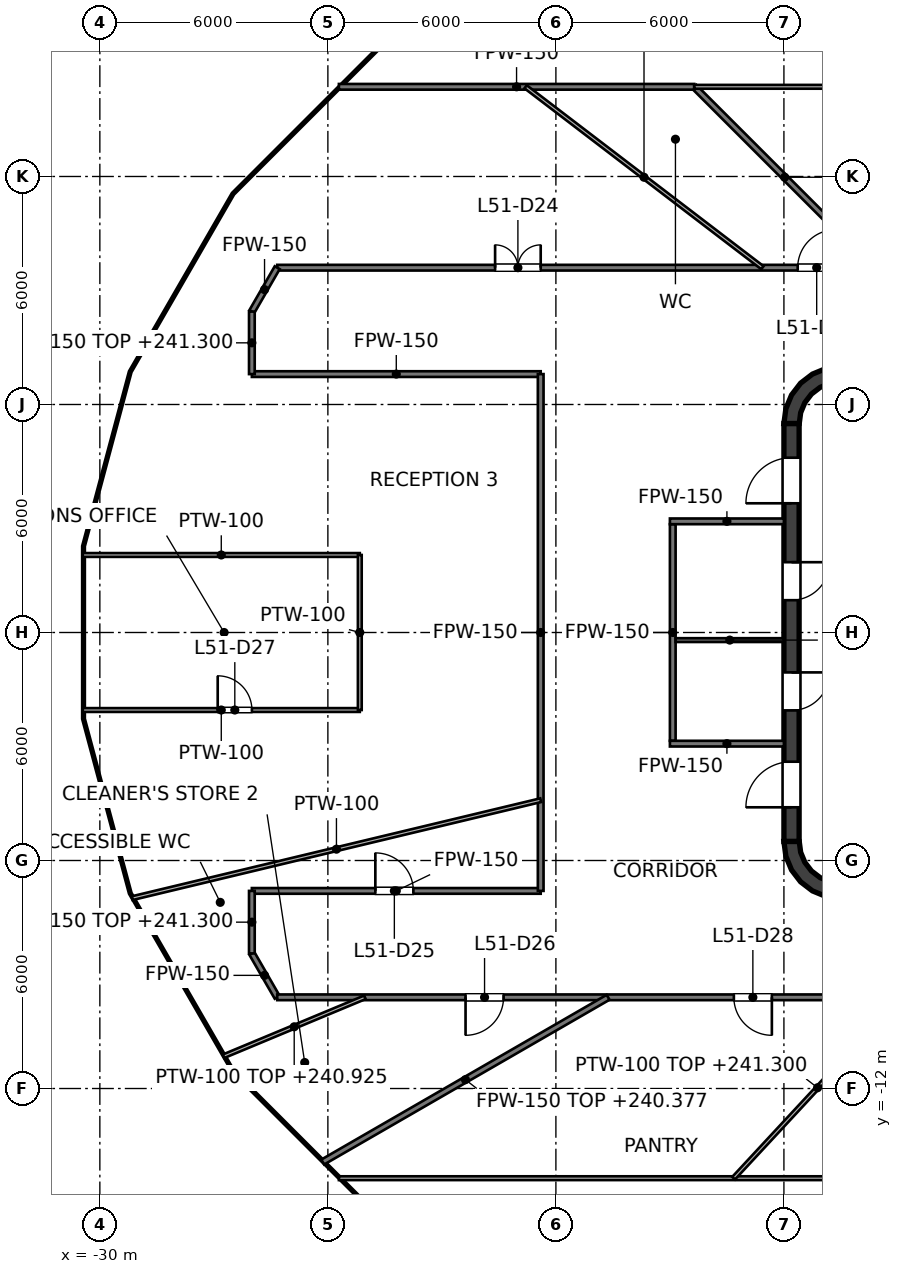
"""IFC4 building model, lengths in metres.
Left out: names, types, materials, properties, quantities, classifications, styles, units other than length and angle.
Written with IfcOpenShell. Run it as: python <this file> out.ifc"""

import sys

from ifc_helpers import new_model, si_unit, direction, frame, frame_2d, origin, place, context, subcontext, project, spatial, polyline, rectangle, outline, extrude, element, fill, save


model = new_model("IFC4")
c1 = context("Model", 3, precision=1e-05, world=origin(), true_north=direction((0.0, 1.0)))
c2 = subcontext(c1, "Body", "Model", "MODEL_VIEW")
j1 = project(units=[si_unit("LENGTHUNIT", "METRE"), si_unit("PLANEANGLEUNIT", "RADIAN")], contexts=[c1])
p1 = place(None, origin())
s1 = spatial("IfcSite", under=j1, at=p1, CompositionType="ELEMENT")
p2 = place(p1, origin())
s2 = spatial("IfcBuilding", under=s1, at=p2, CompositionType="ELEMENT")
p3 = place(p2, frame((0.0, 0.0, 237.6)))
s3 = spatial("IfcBuildingStorey", under=s2, at=p3, CompositionType="ELEMENT", Elevation=237.6)
p4 = place(p3, frame((-11.8, -5.5, 0.0), z_axis=(0.0, 0.0, 1.0), x_axis=(0.0, 1.0, 0.0)))
e1 = element("IfcWall", 1, at=p4, inside=s3, PredefinedType="SHEAR", context=c2, shape_type="SweptSolid", body=[
    extrude(rectangle(XDim=11.0, YDim=0.4, at=frame_2d((5.5, 0.0))), origin(), (0.0, 0.0, 1.0), 4.0),
])
p5 = place(p4, frame((3.45, 0.0, 0.0)))
e2 = element("IfcOpeningElement", 2, at=p5, cuts=e1, PredefinedType="OPENING", context=c2, shape_type="SweptSolid", body=[
    extrude(rectangle(XDim=1.0, YDim=2.1, at=frame_2d((0.5, 1.05))), frame((0.0, 0.2, 0.0), z_axis=(0.0, -1.0, 0.0), x_axis=(1.0, 0.0, 0.0)), (0.0, 0.0, 1.0), 0.4),
])
p6 = place(p4, frame((6.35, 0.0, 0.0)))
e3 = element("IfcOpeningElement", 3, at=p6, cuts=e1, PredefinedType="OPENING", context=c2, shape_type="SweptSolid", body=[
    extrude(rectangle(XDim=1.0, YDim=2.1, at=frame_2d((0.5, 1.05))), frame((0.0, 0.2, 0.0), z_axis=(0.0, -1.0, 0.0), x_axis=(1.0, 0.0, 0.0)), (0.0, 0.0, 1.0), 0.4),
])
p7 = place(p4, frame((0.9, 0.0, 0.0)))
e4 = element("IfcOpeningElement", 4, at=p7, cuts=e1, PredefinedType="OPENING", context=c2, shape_type="SweptSolid", body=[
    extrude(rectangle(XDim=1.2, YDim=2.1, at=frame_2d((0.6, 1.05))), frame((0.0, 0.2, 0.0), z_axis=(0.0, -1.0, 0.0), x_axis=(1.0, 0.0, 0.0)), (0.0, 0.0, 1.0), 0.4),
])
p8 = place(p4, frame((8.9, 0.0, 0.0)))
e5 = element("IfcOpeningElement", 5, at=p8, cuts=e1, PredefinedType="OPENING", context=c2, shape_type="SweptSolid", body=[
    extrude(rectangle(XDim=1.2, YDim=2.1, at=frame_2d((0.6, 1.05))), frame((0.0, 0.2, 0.0), z_axis=(0.0, -1.0, 0.0), x_axis=(1.0, 0.0, 0.0)), (0.0, 0.0, 1.0), 0.4),
])
p9 = place(p3, origin())
e6 = element("IfcWall", 6, at=p9, inside=s3, PredefinedType="SHEAR", context=c2, shape_type="SweptSolid", body=[
    extrude(outline(polyline([(-12.0, 5.5), (-11.596, 5.5), (-11.559, 5.784), (-11.45, 6.048), (-11.275, 6.275), (-11.048, 6.45), (-10.784, 6.559), (-10.5, 6.596), (-10.5, 7.0), (-10.888, 6.949), (-11.25, 6.799), (-11.561, 6.561), (-11.799, 6.25), (-11.949, 5.888), (-12.0, 5.5)])), origin(), (0.0, 0.0, 1.0), 4.0),
])
e7 = element("IfcWall", 7, at=p9, inside=s3, PredefinedType="SHEAR", context=c2, shape_type="SweptSolid", body=[
    extrude(outline(polyline([(-10.5, -7.0), (-10.5, -6.596), (-10.784, -6.559), (-11.048, -6.45), (-11.275, -6.275), (-11.45, -6.048), (-11.559, -5.784), (-11.596, -5.5), (-12.0, -5.5), (-11.949, -5.888), (-11.799, -6.25), (-11.561, -6.561), (-11.25, -6.799), (-10.888, -6.949), (-10.5, -7.0)])), origin(), (0.0, 0.0, 1.0), 4.0),
])
p10 = place(p3, frame((-14.925, -2.85, 0.0), z_axis=(0.0, 0.0, 1.0), x_axis=(0.0, 1.0, 0.0)))
e8 = element("IfcWall", 8, at=p10, inside=s3, PredefinedType="PARTITIONING", context=c2, shape_type="SweptSolid", body=[
    extrude(rectangle(XDim=5.7, YDim=0.15, at=frame_2d((2.85, 0.0))), origin(), (0.0, 0.0, 1.0), 2.768),
])
for number, where, z_axis, x_axis in (
    (9, (-15.0, 2.925, 0.0), (0.0, 0.0, 1.0), (1.0, 0.0, 0.0)),
    (10, (-15.0, -2.925, 0.0), (0.0, 0.0, 1.0), (1.0, 0.0, 0.0)),
):
    element("IfcWall", number, at=place(p3, frame(where, z_axis=z_axis, x_axis=x_axis)), inside=s3, PredefinedType="PARTITIONING", context=c2, shape_type="SweptSolid", body=[
        extrude(rectangle(XDim=3.0, YDim=0.15, at=frame_2d((1.5, 0.0))), origin(), (0.0, 0.0, 1.0), 2.768),
    ])
p11 = place(p3, frame((-14.85, -0.2, 0.0), z_axis=(0.0, 0.0, 1.0), x_axis=(1.0, 0.0, 0.0)))
e11 = element("IfcWall", 11, at=p11, inside=s3, PredefinedType="PARTITIONING", context=c2, shape_type="SweptSolid", body=[
    extrude(rectangle(XDim=2.85, YDim=0.1, at=frame_2d((1.425, 0.0))), origin(), (0.0, 0.0, 1.0), 2.768),
])
p12 = place(p3, frame((-26.0, -8.445, 0.0), z_axis=(0.0, 0.0, 1.0), x_axis=(0.500076310463, -0.865981341435, 0.0)))
e12 = element("IfcWall", 12, at=p12, inside=s3, PredefinedType="PARTITIONING", context=c2, shape_type="SweptSolid", body=[
    extrude(rectangle(XDim=1.334, YDim=0.15, at=frame_2d((0.667, 0.0))), origin(), (0.0, 0.0, 1.0), 2.768),
])
p13 = place(p3, frame((-14.36, 14.36, 0.0), z_axis=(0.0, 0.0, 1.0), x_axis=(0.707106781187, -0.707106781187, 0.0)))
e13 = element("IfcWall", 13, at=p13, inside=s3, PredefinedType="PARTITIONING", context=c2, shape_type="SweptSolid", body=[
    extrude(rectangle(XDim=6.732, YDim=0.15, at=frame_2d((3.366, 0.0))), origin(), (0.0, 0.0, 1.0), 2.768),
])
p14 = place(p3, frame((-25.333, -9.6, 0.0), z_axis=(0.0, 0.0, 1.0), x_axis=(1.0, 0.0, 0.0)))
e14 = element("IfcWall", 14, at=p14, inside=s3, PredefinedType="PARTITIONING", context=c2, shape_type="SweptSolid", body=[
    extrude(rectangle(XDim=50.666, YDim=0.15, at=frame_2d((25.333, 0.0))), origin(), (0.0, 0.0, 1.0), 2.768),
])
p15 = place(p14, frame((4.956, 0.0, 0.0)))
e15 = element("IfcOpeningElement", 15, at=p15, cuts=e14, PredefinedType="OPENING", context=c2, shape_type="SweptSolid", body=[
    extrude(rectangle(XDim=1.0, YDim=2.1, at=frame_2d((0.5, 1.05))), frame((0.0, 0.075, 0.0), z_axis=(0.0, -1.0, 0.0), x_axis=(1.0, 0.0, 0.0)), (0.0, 0.0, 1.0), 0.15),
])
p16 = place(p14, frame((12.016, 0.0, 0.0)))
e16 = element("IfcOpeningElement", 16, at=p16, cuts=e14, PredefinedType="OPENING", context=c2, shape_type="SweptSolid", body=[
    extrude(rectangle(XDim=1.0, YDim=2.1, at=frame_2d((0.5, 1.05))), frame((0.0, 0.075, 0.0), z_axis=(0.0, -1.0, 0.0), x_axis=(1.0, 0.0, 0.0)), (0.0, 0.0, 1.0), 0.15),
])
p17 = place(p14, frame((18.068, 0.0, 0.0)))
e17 = element("IfcOpeningElement", 17, at=p17, cuts=e14, PredefinedType="OPENING", context=c2, shape_type="SweptSolid", body=[
    extrude(rectangle(XDim=1.0, YDim=2.1, at=frame_2d((0.5, 1.05))), frame((0.0, 0.075, 0.0), z_axis=(0.0, -1.0, 0.0), x_axis=(1.0, 0.0, 0.0)), (0.0, 0.0, 1.0), 0.15),
])
p18 = place(p14, frame((22.521, 0.0, 0.0)))
e18 = element("IfcOpeningElement", 18, at=p18, cuts=e14, PredefinedType="OPENING", context=c2, shape_type="SweptSolid", body=[
    extrude(rectangle(XDim=1.0, YDim=2.1, at=frame_2d((0.5, 1.05))), frame((0.0, 0.075, 0.0), z_axis=(0.0, -1.0, 0.0), x_axis=(1.0, 0.0, 0.0)), (0.0, 0.0, 1.0), 0.15),
])
p19 = place(p14, frame((26.665, 0.0, 0.0)))
e19 = element("IfcOpeningElement", 19, at=p19, cuts=e14, PredefinedType="OPENING", context=c2, shape_type="SweptSolid", body=[
    extrude(rectangle(XDim=1.0, YDim=2.1, at=frame_2d((0.5, 1.05))), frame((0.0, 0.075, 0.0), z_axis=(0.0, -1.0, 0.0), x_axis=(1.0, 0.0, 0.0)), (0.0, 0.0, 1.0), 0.15),
])
p20 = place(p14, frame((31.12, 0.0, 0.0)))
e20 = element("IfcOpeningElement", 20, at=p20, cuts=e14, PredefinedType="OPENING", context=c2, shape_type="SweptSolid", body=[
    extrude(rectangle(XDim=1.0, YDim=2.1, at=frame_2d((0.5, 1.05))), frame((0.0, 0.075, 0.0), z_axis=(0.0, -1.0, 0.0), x_axis=(1.0, 0.0, 0.0)), (0.0, 0.0, 1.0), 0.15),
])
p21 = place(p14, frame((41.953, 0.0, 0.0)))
e21 = element("IfcOpeningElement", 21, at=p21, cuts=e14, PredefinedType="OPENING", context=c2, shape_type="SweptSolid", body=[
    extrude(rectangle(XDim=1.0, YDim=2.1, at=frame_2d((0.5, 1.05))), frame((0.0, 0.075, 0.0), z_axis=(0.0, -1.0, 0.0), x_axis=(1.0, 0.0, 0.0)), (0.0, 0.0, 1.0), 0.15),
])
p22 = place(p3, frame((-26.0, -6.8, 0.0), z_axis=(0.0, 0.0, 1.0), x_axis=(1.0, 0.0, 0.0)))
e22 = element("IfcWall", 22, at=p22, inside=s3, PredefinedType="PARTITIONING", context=c2, shape_type="SweptSolid", body=[
    extrude(rectangle(XDim=7.6, YDim=0.15, at=frame_2d((3.8, 0.0))), origin(), (0.0, 0.0, 1.0), 2.768),
])
p23 = place(p22, frame((3.249, 0.0, 0.0)))
e23 = element("IfcOpeningElement", 23, at=p23, cuts=e22, PredefinedType="OPENING", context=c2, shape_type="SweptSolid", body=[
    extrude(rectangle(XDim=1.0, YDim=2.1, at=frame_2d((0.5, 1.05))), frame((0.0, 0.075, 0.0), z_axis=(0.0, -1.0, 0.0), x_axis=(1.0, 0.0, 0.0)), (0.0, 0.0, 1.0), 0.15),
])
p24 = place(p3, frame((-26.0, 6.8, 0.0), z_axis=(0.0, 0.0, 1.0), x_axis=(1.0, 0.0, 0.0)))
e24 = element("IfcWall", 24, at=p24, inside=s3, PredefinedType="PARTITIONING", context=c2, shape_type="SweptSolid", body=[
    extrude(rectangle(XDim=7.6, YDim=0.15, at=frame_2d((3.8, 0.0))), origin(), (0.0, 0.0, 1.0), 2.768),
])
p25 = place(p3, frame((-25.333, 9.6, 0.0), z_axis=(0.0, 0.0, 1.0), x_axis=(1.0, 0.0, 0.0)))
e25 = element("IfcWall", 25, at=p25, inside=s3, PredefinedType="PARTITIONING", context=c2, shape_type="SweptSolid", body=[
    extrude(rectangle(XDim=50.666, YDim=0.15, at=frame_2d((25.333, 0.0))), origin(), (0.0, 0.0, 1.0), 2.768),
])
p26 = place(p25, frame((40.221, 0.0, 0.0)))
e26 = element("IfcOpeningElement", 26, at=p26, cuts=e25, PredefinedType="OPENING", context=c2, shape_type="SweptSolid", body=[
    extrude(rectangle(XDim=1.2, YDim=2.1, at=frame_2d((0.6, 1.05))), frame((0.0, 0.075, 0.0), z_axis=(0.0, -1.0, 0.0), x_axis=(1.0, 0.0, 0.0)), (0.0, 0.0, 1.0), 0.15),
])
p27 = place(p25, frame((28.328, 0.0, 0.0)))
e27 = element("IfcOpeningElement", 27, at=p27, cuts=e25, PredefinedType="OPENING", context=c2, shape_type="SweptSolid", body=[
    extrude(rectangle(XDim=1.0, YDim=2.1, at=frame_2d((0.5, 1.05))), frame((0.0, 0.075, 0.0), z_axis=(0.0, -1.0, 0.0), x_axis=(1.0, 0.0, 0.0)), (0.0, 0.0, 1.0), 0.15),
])
p28 = place(p25, frame((24.461, 0.0, 0.0)))
e28 = element("IfcOpeningElement", 28, at=p28, cuts=e25, PredefinedType="OPENING", context=c2, shape_type="SweptSolid", body=[
    extrude(rectangle(XDim=1.0, YDim=2.1, at=frame_2d((0.5, 1.05))), frame((0.0, 0.075, 0.0), z_axis=(0.0, -1.0, 0.0), x_axis=(1.0, 0.0, 0.0)), (0.0, 0.0, 1.0), 0.15),
])
p29 = place(p25, frame((18.938, 0.0, 0.0)))
e29 = element("IfcOpeningElement", 29, at=p29, cuts=e25, PredefinedType="OPENING", context=c2, shape_type="SweptSolid", body=[
    extrude(rectangle(XDim=1.0, YDim=2.1, at=frame_2d((0.5, 1.05))), frame((0.0, 0.075, 0.0), z_axis=(0.0, -1.0, 0.0), x_axis=(1.0, 0.0, 0.0)), (0.0, 0.0, 1.0), 0.15),
])
p30 = place(p25, frame((13.695, 0.0, 0.0)))
e30 = element("IfcOpeningElement", 30, at=p30, cuts=e25, PredefinedType="OPENING", context=c2, shape_type="SweptSolid", body=[
    extrude(rectangle(XDim=1.0, YDim=2.1, at=frame_2d((0.5, 1.05))), frame((0.0, 0.075, 0.0), z_axis=(0.0, -1.0, 0.0), x_axis=(1.0, 0.0, 0.0)), (0.0, 0.0, 1.0), 0.15),
])
p31 = place(p25, frame((5.733, 0.0, 0.0)))
e31 = element("IfcOpeningElement", 31, at=p31, cuts=e25, PredefinedType="OPENING", context=c2, shape_type="SweptSolid", body=[
    extrude(rectangle(XDim=1.2, YDim=2.1, at=frame_2d((0.6, 1.05))), frame((0.0, 0.075, 0.0), z_axis=(0.0, -1.0, 0.0), x_axis=(1.0, 0.0, 0.0)), (0.0, 0.0, 1.0), 0.15),
])
p32 = place(p3, frame((-23.71, 14.36, 0.0), z_axis=(0.0, 0.0, 1.0), x_axis=(1.0, 0.0, 0.0)))
e32 = element("IfcWall", 32, at=p32, inside=s3, PredefinedType="PARTITIONING", context=c2, shape_type="SweptSolid", body=[
    extrude(rectangle(XDim=9.35, YDim=0.15, at=frame_2d((4.675, 0.0))), origin(), (0.0, 0.0, 1.0), 2.768),
])
p33 = place(p3, frame((-24.135, -13.935, 0.0), z_axis=(0.0, 0.0, 1.0), x_axis=(0.866016292776, 0.500015780397, 0.0)))
e33 = element("IfcWall", 33, at=p33, inside=s3, PredefinedType="PARTITIONING", context=c2, shape_type="SweptSolid", body=[
    extrude(rectangle(XDim=8.67, YDim=0.15, at=frame_2d((4.335, 0.0))), origin(), (0.0, 0.0, 1.0), 2.777),
])
p34 = place(p3, frame((-26.0, 8.445, 0.0), z_axis=(0.0, 0.0, 1.0), x_axis=(0.500076310463, 0.865981341435, 0.0)))
e34 = element("IfcWall", 34, at=p34, inside=s3, PredefinedType="PARTITIONING", context=c2, shape_type="SweptSolid", body=[
    extrude(rectangle(XDim=1.334, YDim=0.15, at=frame_2d((0.667, 0.0))), origin(), (0.0, 0.0, 1.0), 2.768),
])
p35 = place(p3, frame((-18.4, -6.8, 0.0), z_axis=(0.0, 0.0, 1.0), x_axis=(0.0, 1.0, 0.0)))
e35 = element("IfcWall", 35, at=p35, inside=s3, PredefinedType="PARTITIONING", context=c2, shape_type="SweptSolid", body=[
    extrude(rectangle(XDim=13.6, YDim=0.15, at=frame_2d((6.8, 0.0))), origin(), (0.0, 0.0, 1.0), 2.768),
])
for number, where, z_axis, x_axis in (
    (36, (-26.0, -8.445, 0.0), (0.0, 0.0, 1.0), (0.0, 1.0, 0.0)),
    (37, (-26.0, 6.8, 0.0), (0.0, 0.0, 1.0), (0.0, 1.0, 0.0)),
):
    element("IfcWall", number, at=place(p3, frame(where, z_axis=z_axis, x_axis=x_axis)), inside=s3, PredefinedType="PARTITIONING", context=c2, shape_type="SweptSolid", body=[
        extrude(rectangle(XDim=1.645, YDim=0.15, at=frame_2d((0.823, 0.0))), origin(), (0.0, 0.0, 1.0), 3.7),
    ])
p36 = place(p3, frame((-18.797, 14.36, 0.0), z_axis=(0.0, 0.0, 1.0), x_axis=(0.794667043869, -0.607045541445, 0.0)))
e38 = element("IfcWall", 38, at=p36, inside=s3, PredefinedType="PARTITIONING", context=c2, shape_type="SweptSolid", body=[
    extrude(rectangle(XDim=7.841, YDim=0.1, at=frame_2d((3.921, 0.0))), origin(), (0.0, 0.0, 1.0), 3.7),
])
p37 = place(p3, frame((-23.71, -14.36, 0.0), z_axis=(0.0, 0.0, 1.0), x_axis=(1.0, 0.0, 0.0)))
e39 = element("IfcWall", 39, at=p37, inside=s3, PredefinedType="PARTITIONING", context=c2, shape_type="SweptSolid", body=[
    extrude(rectangle(XDim=47.42, YDim=0.1, at=frame_2d((23.71, 0.0))), origin(), (0.0, 0.0, 1.0), 2.768),
])
p38 = place(p37, frame((19.302, 0.0, 0.0)))
e40 = element("IfcOpeningElement", 40, at=p38, cuts=e39, PredefinedType="OPENING", context=c2, shape_type="SweptSolid", body=[
    extrude(rectangle(XDim=1.8, YDim=2.1, at=frame_2d((0.9, 1.05))), frame((0.0, 0.05, 0.0), z_axis=(0.0, -1.0, 0.0), x_axis=(1.0, 0.0, 0.0)), (0.0, 0.0, 1.0), 0.1),
])
p39 = place(p37, frame((41.074, 0.0, 0.0)))
e41 = element("IfcOpeningElement", 41, at=p39, cuts=e39, PredefinedType="OPENING", context=c2, shape_type="SweptSolid", body=[
    extrude(rectangle(XDim=1.8, YDim=2.1, at=frame_2d((0.9, 1.05))), frame((0.0, 0.05, 0.0), z_axis=(0.0, -1.0, 0.0), x_axis=(1.0, 0.0, 0.0)), (0.0, 0.0, 1.0), 0.1),
])
p40 = place(p3, frame((-30.45, -2.04, 0.0), z_axis=(0.0, 0.0, 1.0), x_axis=(1.0, 0.0, 0.0)))
e42 = element("IfcWall", 42, at=p40, inside=s3, PredefinedType="PARTITIONING", context=c2, shape_type="SweptSolid", body=[
    extrude(rectangle(XDim=7.29, YDim=0.1, at=frame_2d((3.645, 0.0))), origin(), (0.0, 0.0, 1.0), 2.768),
])
p41 = place(p40, frame((3.551, 0.0, 0.0)))
e43 = element("IfcOpeningElement", 43, at=p41, cuts=e42, PredefinedType="OPENING", context=c2, shape_type="SweptSolid", body=[
    extrude(rectangle(XDim=0.9, YDim=2.1, at=frame_2d((0.45, 1.05))), frame((0.0, 0.05, 0.0), z_axis=(0.0, -1.0, 0.0), x_axis=(1.0, 0.0, 0.0)), (0.0, 0.0, 1.0), 0.1),
])
p42 = place(p3, frame((-30.45, 2.04, 0.0), z_axis=(0.0, 0.0, 1.0), x_axis=(1.0, 0.0, 0.0)))
e44 = element("IfcWall", 44, at=p42, inside=s3, PredefinedType="PARTITIONING", context=c2, shape_type="SweptSolid", body=[
    extrude(rectangle(XDim=7.29, YDim=0.1, at=frame_2d((3.645, 0.0))), origin(), (0.0, 0.0, 1.0), 2.768),
])
p43 = place(p3, frame((-14.36, 14.36, 0.0), z_axis=(0.0, 0.0, 1.0), x_axis=(1.0, 0.0, 0.0)))
e45 = element("IfcWall", 45, at=p43, inside=s3, PredefinedType="PARTITIONING", context=c2, shape_type="SweptSolid", body=[
    extrude(rectangle(XDim=22.651, YDim=0.1, at=frame_2d((11.326, 0.0))), origin(), (0.0, 0.0, 1.0), 2.768),
])
p44 = place(p43, frame((4.642, 0.0, 0.0)))
e46 = element("IfcOpeningElement", 46, at=p44, cuts=e45, PredefinedType="OPENING", context=c2, shape_type="SweptSolid", body=[
    extrude(rectangle(XDim=1.8, YDim=2.1, at=frame_2d((0.9, 1.05))), frame((0.0, 0.05, 0.0), z_axis=(0.0, -1.0, 0.0), x_axis=(1.0, 0.0, 0.0)), (0.0, 0.0, 1.0), 0.1),
])
p45 = place(p3, frame((-29.149, -6.991, 0.0), z_axis=(0.0, 0.0, 1.0), x_axis=(0.97242598182, 0.233211727583, 0.0)))
e47 = element("IfcWall", 47, at=p45, inside=s3, PredefinedType="PARTITIONING", context=c2, shape_type="SweptSolid", body=[
    extrude(rectangle(XDim=11.054, YDim=0.1, at=frame_2d((5.527, 0.0))), origin(), (0.0, 0.0, 1.0), 2.768),
])
p46 = place(p3, frame((-26.747, -11.152, 0.0), z_axis=(0.0, 0.0, 1.0), x_axis=(0.922980174508, 0.384847498973, 0.0)))
e48 = element("IfcWall", 48, at=p46, inside=s3, PredefinedType="PARTITIONING", context=c2, shape_type="SweptSolid", body=[
    extrude(rectangle(XDim=4.033, YDim=0.1, at=frame_2d((2.016, 0.0))), origin(), (0.0, 0.0, 1.0), 3.325),
])
p47 = place(p3, frame((-13.324, -14.36, 0.0), z_axis=(0.0, 0.0, 1.0), x_axis=(0.680201581888, 0.733025107344, 0.0)))
e49 = element("IfcWall", 49, at=p47, inside=s3, PredefinedType="PARTITIONING", context=c2, shape_type="SweptSolid", body=[
    extrude(rectangle(XDim=6.494, YDim=0.1, at=frame_2d((3.247, 0.0))), origin(), (0.0, 0.0, 1.0), 3.7),
])
p48 = place(p3, frame((-23.16, -2.04, 0.0), z_axis=(0.0, 0.0, 1.0), x_axis=(0.0, 1.0, 0.0)))
e50 = element("IfcWall", 50, at=p48, inside=s3, PredefinedType="PARTITIONING", context=c2, shape_type="SweptSolid", body=[
    extrude(rectangle(XDim=4.08, YDim=0.1, at=frame_2d((2.04, 0.0))), origin(), (0.0, 0.0, 1.0), 2.768),
])
p49 = place(p5, origin())
e51 = element("IfcDoor", 51, at=p49, inside=s3, OperationType="SINGLE_SWING_RIGHT", PredefinedType="DOOR", context=c2, shape_type="SweptSolid", body=[
    extrude(rectangle(XDim=1.0, YDim=2.1, at=frame_2d((0.5, 1.05))), frame((0.0, 0.025, 0.0), z_axis=(0.0, -1.0, 0.0), x_axis=(1.0, 0.0, 0.0)), (0.0, 0.0, 1.0), 0.05),
])
fill(e2, e51)
p50 = place(p6, origin())
e52 = element("IfcDoor", 52, at=p50, inside=s3, OperationType="SINGLE_SWING_RIGHT", PredefinedType="DOOR", context=c2, shape_type="SweptSolid", body=[
    extrude(rectangle(XDim=1.0, YDim=2.1, at=frame_2d((0.5, 1.05))), frame((0.0, 0.025, 0.0), z_axis=(0.0, -1.0, 0.0), x_axis=(1.0, 0.0, 0.0)), (0.0, 0.0, 1.0), 0.05),
])
fill(e3, e52)
p51 = place(p7, origin())
e53 = element("IfcDoor", 53, at=p51, inside=s3, OperationType="SINGLE_SWING_LEFT", PredefinedType="DOOR", context=c2, shape_type="SweptSolid", body=[
    extrude(rectangle(XDim=1.2, YDim=2.1, at=frame_2d((0.6, 1.05))), frame((0.0, 0.025, 0.0), z_axis=(0.0, -1.0, 0.0), x_axis=(1.0, 0.0, 0.0)), (0.0, 0.0, 1.0), 0.05),
])
fill(e4, e53)
p52 = place(p8, origin())
e54 = element("IfcDoor", 54, at=p52, inside=s3, OperationType="SINGLE_SWING_LEFT", PredefinedType="DOOR", context=c2, shape_type="SweptSolid", body=[
    extrude(rectangle(XDim=1.2, YDim=2.1, at=frame_2d((0.6, 1.05))), frame((0.0, 0.025, 0.0), z_axis=(0.0, -1.0, 0.0), x_axis=(1.0, 0.0, 0.0)), (0.0, 0.0, 1.0), 0.05),
])
fill(e5, e54)
p53 = place(p30, origin())
e55 = element("IfcDoor", 55, at=p53, inside=s3, OperationType="SINGLE_SWING_RIGHT", PredefinedType="DOOR", context=c2, shape_type="SweptSolid", body=[
    extrude(rectangle(XDim=1.0, YDim=2.1, at=frame_2d((0.5, 1.05))), frame((0.0, 0.025, 0.0), z_axis=(0.0, -1.0, 0.0), x_axis=(1.0, 0.0, 0.0)), (0.0, 0.0, 1.0), 0.05),
])
fill(e30, e55)
p54 = place(p31, origin())
e56 = element("IfcDoor", 56, at=p54, inside=s3, OperationType="DOUBLE_DOOR_SINGLE_SWING", PredefinedType="DOOR", context=c2, shape_type="SweptSolid", body=[
    extrude(rectangle(XDim=1.2, YDim=2.1, at=frame_2d((0.6, 1.05))), frame((0.0, 0.025, 0.0), z_axis=(0.0, -1.0, 0.0), x_axis=(1.0, 0.0, 0.0)), (0.0, 0.0, 1.0), 0.05),
])
fill(e31, e56)
p55 = place(p23, origin())
e57 = element("IfcDoor", 57, at=p55, inside=s3, OperationType="SINGLE_SWING_LEFT", PredefinedType="DOOR", context=c2, shape_type="SweptSolid", body=[
    extrude(rectangle(XDim=1.0, YDim=2.1, at=frame_2d((0.5, 1.05))), frame((0.0, 0.025, 0.0), z_axis=(0.0, -1.0, 0.0), x_axis=(1.0, 0.0, 0.0)), (0.0, 0.0, 1.0), 0.05),
])
fill(e23, e57)
p56 = place(p15, origin())
e58 = element("IfcDoor", 58, at=p56, inside=s3, OperationType="SINGLE_SWING_LEFT", PredefinedType="DOOR", context=c2, shape_type="SweptSolid", body=[
    extrude(rectangle(XDim=1.0, YDim=2.1, at=frame_2d((0.5, 1.05))), frame((0.0, 0.025, 0.0), z_axis=(0.0, -1.0, 0.0), x_axis=(1.0, 0.0, 0.0)), (0.0, 0.0, 1.0), 0.05),
])
fill(e15, e58)
p57 = place(p41, origin())
e59 = element("IfcDoor", 59, at=p57, inside=s3, OperationType="SINGLE_SWING_LEFT", PredefinedType="DOOR", context=c2, shape_type="SweptSolid", body=[
    extrude(rectangle(XDim=0.9, YDim=2.1, at=frame_2d((0.45, 1.05))), frame((0.0, 0.025, 0.0), z_axis=(0.0, -1.0, 0.0), x_axis=(1.0, 0.0, 0.0)), (0.0, 0.0, 1.0), 0.05),
])
fill(e43, e59)
p58 = place(p16, origin())
e60 = element("IfcDoor", 60, at=p58, inside=s3, OperationType="SINGLE_SWING_RIGHT", PredefinedType="DOOR", context=c2, shape_type="SweptSolid", body=[
    extrude(rectangle(XDim=1.0, YDim=2.1, at=frame_2d((0.5, 1.05))), frame((0.0, 0.025, 0.0), z_axis=(0.0, -1.0, 0.0), x_axis=(1.0, 0.0, 0.0)), (0.0, 0.0, 1.0), 0.05),
])
fill(e16, e60)
save(model, sys.argv[1])
